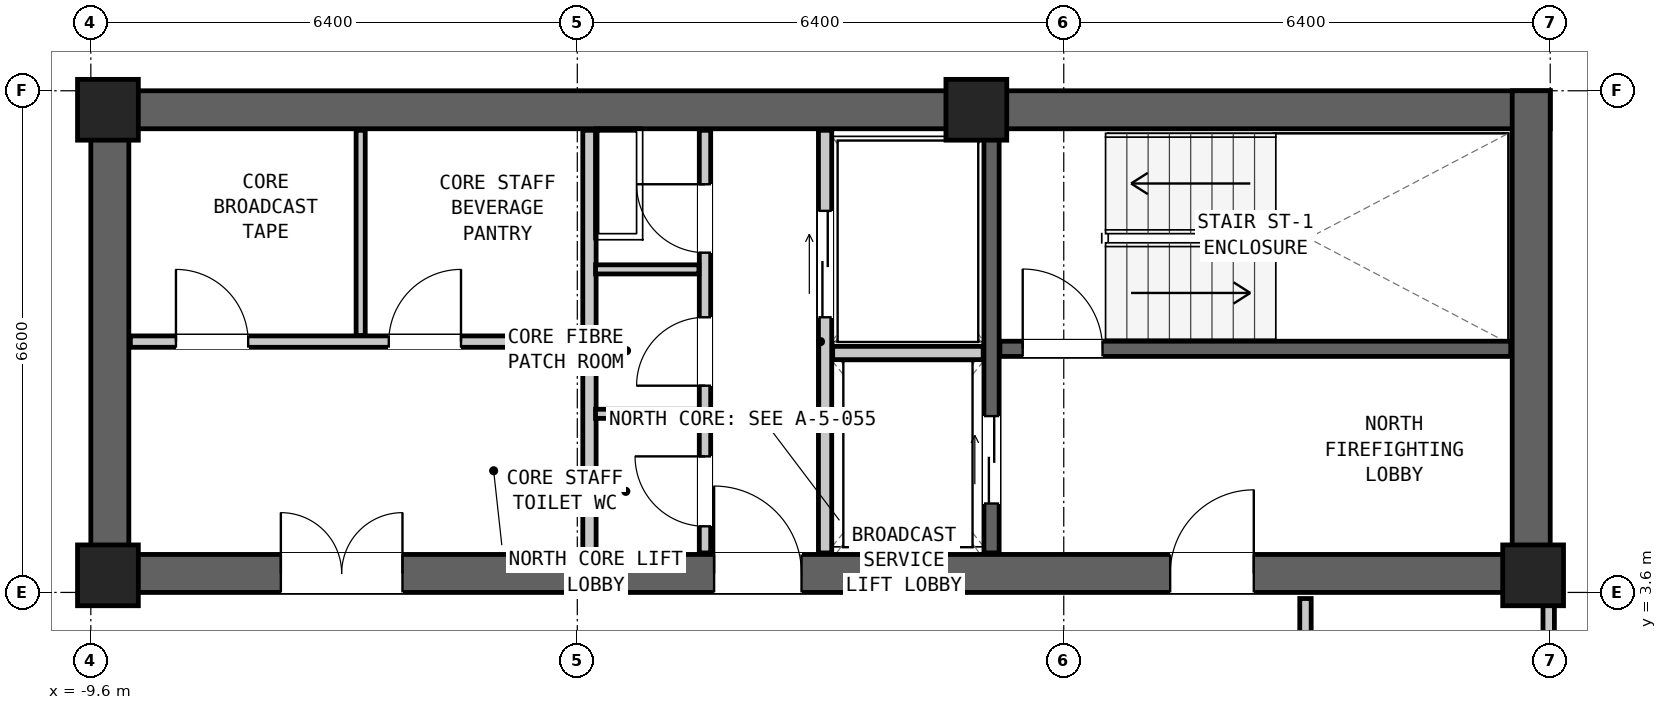
"""IFC4 building model, lengths in metres.
Left out: names, types, materials, properties, quantities, classifications, styles, units other than length and angle.
Written with IfcOpenShell. Run it as: python <this file> out.ifc"""

import sys

from ifc_helpers import new_model, si_unit, direction, frame, frame_2d, origin, origin_2d, place, context, subcontext, project, spatial, rectangle, extrude, element, fill, save


model = new_model("IFC4")
c1 = context("Model", 3, precision=1e-05, world=origin(), true_north=direction((0.0, 1.0)))
c2 = subcontext(c1, "Body", "Model", "MODEL_VIEW")
j1 = project(units=[si_unit("LENGTHUNIT", "METRE"), si_unit("PLANEANGLEUNIT", "RADIAN")], contexts=[c1])
p1 = place(None, origin())
s1 = spatial("IfcSite", under=j1, at=p1, CompositionType="ELEMENT")
p2 = place(p1, origin())
s2 = spatial("IfcBuilding", under=s1, at=p2, CompositionType="ELEMENT")
p3 = place(p2, frame((0.0, 0.0, 177.5)))
s3 = spatial("IfcBuildingStorey", under=s2, at=p3, CompositionType="ELEMENT", Elevation=177.5)
p4 = place(p3, frame((-9.6, 9.95, 0.0), z_axis=(0.0, 0.0, 1.0), x_axis=(1.0, 0.0, 0.0)))
e1 = element("IfcWall", 1, at=p4, inside=s3, PredefinedType="SHEAR", context=c2, shape_type="SweptSolid", body=[
    extrude(rectangle(XDim=19.2, YDim=0.5, at=frame_2d((9.6, 0.0))), origin(), (0.0, 0.0, 1.0), 3.05),
])
p5 = place(p3, frame((-9.6, 3.85, 0.0), z_axis=(0.0, 0.0, 1.0), x_axis=(1.0, 0.0, 0.0)))
e2 = element("IfcWall", 2, at=p5, inside=s3, PredefinedType="SHEAR", context=c2, shape_type="SweptSolid", body=[
    extrude(rectangle(XDim=19.2, YDim=0.5, at=frame_2d((9.6, 0.0))), origin(), (0.0, 0.0, 1.0), 3.05),
])
p6 = place(p5, frame((14.2, 0.0, 0.0)))
e3 = element("IfcOpeningElement", 3, at=p6, cuts=e2, PredefinedType="OPENING", context=c2, shape_type="SweptSolid", body=[
    extrude(rectangle(XDim=1.1, YDim=2.08, at=frame_2d((0.55, 1.04))), frame((0.0, 0.262, 0.0), z_axis=(0.0, -1.0, 0.0), x_axis=(1.0, 0.0, 0.0)), (0.0, 0.0, 1.0), 0.524),
])
p7 = place(p5, frame((8.2, 0.0, 0.0)))
e4 = element("IfcOpeningElement", 4, at=p7, cuts=e2, PredefinedType="OPENING", context=c2, shape_type="SweptSolid", body=[
    extrude(rectangle(XDim=1.15, YDim=2.1, at=frame_2d((0.575, 1.05))), frame((0.0, 0.262, 0.0), z_axis=(0.0, -1.0, 0.0), x_axis=(1.0, 0.0, 0.0)), (0.0, 0.0, 1.0), 0.524),
])
p8 = place(p5, frame((2.5, 0.0, 0.0)))
e5 = element("IfcOpeningElement", 5, at=p8, cuts=e2, PredefinedType="OPENING", context=c2, shape_type="SweptSolid", body=[
    extrude(rectangle(XDim=1.6, YDim=2.12, at=frame_2d((0.8, 1.06))), frame((0.0, 0.262, 0.0), z_axis=(0.0, -1.0, 0.0), x_axis=(1.0, 0.0, 0.0)), (0.0, 0.0, 1.0), 0.524),
])
for number, where, z_axis, x_axis in (
    (6, (-9.35, 3.6, 0.0), (0.0, 0.0, 1.0), (0.0, 1.0, 0.0)),
    (7, (9.35, 3.6, 0.0), (0.0, 0.0, 1.0), (0.0, 1.0, 0.0)),
):
    element("IfcWall", number, at=place(p3, frame(where, z_axis=z_axis, x_axis=x_axis)), inside=s3, PredefinedType="SHEAR", context=c2, shape_type="SweptSolid", body=[
        extrude(rectangle(XDim=6.6, YDim=0.5, at=frame_2d((3.3, 0.0))), origin(), (0.0, 0.0, 1.0), 3.05),
    ])
for number, where, z_axis, x_axis in (
    (8, (-9.375, 9.95, 0.0), (0.0, 0.0, 1.0), (1.0, 0.0, 0.0)),
    (9, (2.05, 9.95, 0.0), (0.0, 0.0, 1.0), (1.0, 0.0, 0.0)),
    (10, (-9.375, 3.825, 0.0), (0.0, 0.0, 1.0), (1.0, 0.0, 0.0)),
    (11, (9.375, 3.825, 0.0), (0.0, 0.0, 1.0), (1.0, 0.0, 0.0)),
):
    element("IfcColumn", number, at=place(p3, frame(where, z_axis=z_axis, x_axis=x_axis)), inside=s3, PredefinedType="COLUMN", context=c2, shape_type="SweptSolid", body=[
        extrude(rectangle(XDim=0.8, YDim=0.8, at=origin_2d()), origin(), (0.0, 0.0, 1.0), 3.05),
    ])
p9 = place(p3, frame((2.36, 6.805, 0.0), z_axis=(0.0, 0.0, 1.0), x_axis=(1.0, 0.0, 0.0)))
e12 = element("IfcWall", 12, at=p9, inside=s3, PredefinedType="SHEAR", context=c2, shape_type="SweptSolid", body=[
    extrude(rectangle(XDim=6.72, YDim=0.2, at=frame_2d((3.36, 0.0))), origin(), (0.0, 0.0, 1.0), 2.83),
])
p10 = place(p9, frame((0.3, 0.0, 0.0)))
e13 = element("IfcOpeningElement", 13, at=p10, cuts=e12, PredefinedType="OPENING", context=c2, shape_type="SweptSolid", body=[
    extrude(rectangle(XDim=1.05, YDim=2.08, at=frame_2d((0.525, 1.04))), frame((0.0, 0.112, 0.0), z_axis=(0.0, -1.0, 0.0), x_axis=(1.0, 0.0, 0.0)), (0.0, 0.0, 1.0), 0.224),
])
p11 = place(p3, frame((2.25, 4.12, 0.0), z_axis=(0.0, 0.0, 1.0), x_axis=(0.0, 1.0, 0.0)))
e14 = element("IfcWall", 14, at=p11, inside=s3, PredefinedType="SHEAR", context=c2, shape_type="SweptSolid", body=[
    extrude(rectangle(XDim=5.56, YDim=0.2, at=frame_2d((2.78, 0.0))), origin(), (0.0, 0.0, 1.0), 2.83),
])
p12 = place(p11, frame((0.65, 0.0, 0.0)))
e15 = element("IfcOpeningElement", 15, at=p12, cuts=e14, PredefinedType="OPENING", context=c2, shape_type="SweptSolid", body=[
    extrude(rectangle(XDim=1.15, YDim=2.08, at=frame_2d((0.575, 1.04))), frame((0.0, 0.112, 0.0), z_axis=(0.0, -1.0, 0.0), x_axis=(1.0, 0.0, 0.0)), (0.0, 0.0, 1.0), 0.224),
])
p13 = place(p3, frame((0.06, 4.12, 0.0), z_axis=(0.0, 0.0, 1.0), x_axis=(0.0, 1.0, 0.0)))
e16 = element("IfcWall", 16, at=p13, inside=s3, PredefinedType="PARTITIONING", context=c2, shape_type="SweptSolid", body=[
    extrude(rectangle(XDim=5.56, YDim=0.175, at=frame_2d((2.78, 0.0))), origin(), (0.0, 0.0, 1.0), 2.83),
])
p14 = place(p13, frame((3.1, 0.0, 0.0)))
e17 = element("IfcOpeningElement", 17, at=p14, cuts=e16, PredefinedType="OPENING", context=c2, shape_type="SweptSolid", body=[
    extrude(rectangle(XDim=1.4, YDim=2.12, at=frame_2d((0.7, 1.06))), frame((0.0, 0.1, 0.0), z_axis=(0.0, -1.0, 0.0), x_axis=(1.0, 0.0, 0.0)), (0.0, 0.0, 1.0), 0.199),
])
p15 = place(p3, frame((0.16, 6.75, 0.0), z_axis=(0.0, 0.0, 1.0), x_axis=(1.0, 0.0, 0.0)))
e18 = element("IfcWall", 18, at=p15, inside=s3, PredefinedType="PARTITIONING", context=c2, shape_type="SweptSolid", body=[
    extrude(rectangle(XDim=1.98, YDim=0.175, at=frame_2d((0.99, 0.0))), origin(), (0.0, 0.0, 1.0), 2.83),
])
p16 = place(p3, frame((-3.04, 4.12, 0.0), z_axis=(0.0, 0.0, 1.0), x_axis=(0.0, 1.0, 0.0)))
e19 = element("IfcWall", 19, at=p16, inside=s3, PredefinedType="PARTITIONING", context=c2, shape_type="SweptSolid", body=[
    extrude(rectangle(XDim=5.56, YDim=0.175, at=frame_2d((2.78, 0.0))), origin(), (0.0, 0.0, 1.0), 2.83),
])
p17 = place(p3, frame((-1.52, 4.12, 0.0), z_axis=(0.0, 0.0, 1.0), x_axis=(0.0, 1.0, 0.0)))
e20 = element("IfcWall", 20, at=p17, inside=s3, PredefinedType="PARTITIONING", context=c2, shape_type="SweptSolid", body=[
    extrude(rectangle(XDim=5.56, YDim=0.15, at=frame_2d((2.78, 0.0))), origin(), (0.0, 0.0, 1.0), 2.83),
])
p18 = place(p17, frame((3.95, 0.0, 0.0)))
e21 = element("IfcOpeningElement", 21, at=p18, cuts=e20, PredefinedType="OPENING", context=c2, shape_type="SweptSolid", body=[
    extrude(rectangle(XDim=0.9, YDim=2.05, at=frame_2d((0.45, 1.025))), frame((0.0, 0.087, 0.0), z_axis=(0.0, -1.0, 0.0), x_axis=(1.0, 0.0, 0.0)), (0.0, 0.0, 1.0), 0.174),
])
p19 = place(p17, frame((2.2, 0.0, 0.0)))
e22 = element("IfcOpeningElement", 22, at=p19, cuts=e20, PredefinedType="OPENING", context=c2, shape_type="SweptSolid", body=[
    extrude(rectangle(XDim=0.9, YDim=2.05, at=frame_2d((0.45, 1.025))), frame((0.0, 0.087, 0.0), z_axis=(0.0, -1.0, 0.0), x_axis=(1.0, 0.0, 0.0)), (0.0, 0.0, 1.0), 0.174),
])
p20 = place(p17, frame((0.35, 0.0, 0.0)))
e23 = element("IfcOpeningElement", 23, at=p20, cuts=e20, PredefinedType="OPENING", context=c2, shape_type="SweptSolid", body=[
    extrude(rectangle(XDim=0.92, YDim=2.1, at=frame_2d((0.46, 1.05))), frame((0.0, 0.087, 0.0), z_axis=(0.0, -1.0, 0.0), x_axis=(1.0, 0.0, 0.0)), (0.0, 0.0, 1.0), 0.174),
])
for number, where, z_axis, x_axis in (
    (24, (-2.96, 5.95, 0.0), (0.0, 0.0, 1.0), (1.0, 0.0, 0.0)),
    (25, (-2.96, 7.85, 0.0), (0.0, 0.0, 1.0), (1.0, 0.0, 0.0)),
):
    element("IfcWall", number, at=place(p3, frame(where, z_axis=z_axis, x_axis=x_axis)), inside=s3, PredefinedType="PARTITIONING", context=c2, shape_type="SweptSolid", body=[
        extrude(rectangle(XDim=1.36, YDim=0.12, at=frame_2d((0.68, 0.0))), origin(), (0.0, 0.0, 1.0), 2.83),
    ])
p21 = place(p3, frame((-9.08, 6.9, 0.0), z_axis=(0.0, 0.0, 1.0), x_axis=(1.0, 0.0, 0.0)))
e26 = element("IfcWall", 26, at=p21, inside=s3, PredefinedType="PARTITIONING", context=c2, shape_type="SweptSolid", body=[
    extrude(rectangle(XDim=5.96, YDim=0.15, at=frame_2d((2.98, 0.0))), origin(), (0.0, 0.0, 1.0), 2.83),
])
p22 = place(p21, frame((0.6, 0.0, 0.0)))
e27 = element("IfcOpeningElement", 27, at=p22, cuts=e26, PredefinedType="OPENING", context=c2, shape_type="SweptSolid", body=[
    extrude(rectangle(XDim=0.95, YDim=2.1, at=frame_2d((0.475, 1.05))), frame((0.0, 0.087, 0.0), z_axis=(0.0, -1.0, 0.0), x_axis=(1.0, 0.0, 0.0)), (0.0, 0.0, 1.0), 0.174),
])
p23 = place(p21, frame((3.4, 0.0, 0.0)))
e28 = element("IfcOpeningElement", 28, at=p23, cuts=e26, PredefinedType="OPENING", context=c2, shape_type="SweptSolid", body=[
    extrude(rectangle(XDim=0.95, YDim=2.1, at=frame_2d((0.475, 1.05))), frame((0.0, 0.087, 0.0), z_axis=(0.0, -1.0, 0.0), x_axis=(1.0, 0.0, 0.0)), (0.0, 0.0, 1.0), 0.174),
])
p24 = place(p3, frame((-6.05, 6.98, 0.0), z_axis=(0.0, 0.0, 1.0), x_axis=(0.0, 1.0, 0.0)))
e29 = element("IfcWall", 29, at=p24, inside=s3, PredefinedType="PARTITIONING", context=c2, shape_type="SweptSolid", body=[
    extrude(rectangle(XDim=2.7, YDim=0.12, at=frame_2d((1.35, 0.0))), origin(), (0.0, 0.0, 1.0), 2.83),
])
p25 = place(p3, frame((6.38, -2.32, 0.0), z_axis=(0.0, 0.0, 1.0), x_axis=(0.0, 1.0, 0.0)))
e30 = element("IfcWall", 30, at=p25, inside=s3, PredefinedType="PARTITIONING", context=c2, shape_type="SweptSolid", body=[
    extrude(rectangle(XDim=5.84, YDim=0.15, at=frame_2d((2.92, 0.0))), origin(), (0.0, 0.0, 1.0), 2.198),
])
p26 = place(p3, frame((9.58, -2.32, 0.0), z_axis=(0.0, 0.0, 1.0), x_axis=(0.0, 1.0, 0.0)))
e31 = element("IfcWall", 31, at=p26, inside=s3, PredefinedType="PARTITIONING", context=c2, shape_type="SweptSolid", body=[
    extrude(rectangle(XDim=5.84, YDim=0.15, at=frame_2d((2.92, 0.0))), origin(), (0.0, 0.0, 1.0), 2.198),
])
p27 = place(p26, frame((2.445, 0.0, 0.0)))
e32 = element("IfcOpeningElement", 32, at=p27, cuts=e31, PredefinedType="OPENING", context=c2, shape_type="SweptSolid", body=[
    extrude(rectangle(XDim=0.95, YDim=2.1, at=frame_2d((0.475, 1.05))), frame((0.0, 0.087, 0.0), z_axis=(0.0, -1.0, 0.0), x_axis=(1.0, 0.0, 0.0)), (0.0, 0.0, 1.0), 0.174),
])
p28 = place(p10, origin())
e33 = element("IfcDoor", 33, at=p28, inside=s3, OperationType="SINGLE_SWING_LEFT", PredefinedType="DOOR", context=c2, shape_type="SweptSolid", body=[
    extrude(rectangle(XDim=1.05, YDim=2.08, at=frame_2d((0.525, 1.04))), frame((0.0, 0.025, 0.0), z_axis=(0.0, -1.0, 0.0), x_axis=(1.0, 0.0, 0.0)), (0.0, 0.0, 1.0), 0.05),
])
fill(e13, e33)
p29 = place(p6, origin())
e34 = element("IfcDoor", 34, at=p29, inside=s3, OperationType="SINGLE_SWING_RIGHT", PredefinedType="DOOR", context=c2, shape_type="SweptSolid", body=[
    extrude(rectangle(XDim=1.1, YDim=2.08, at=frame_2d((0.55, 1.04))), frame((0.0, 0.025, 0.0), z_axis=(0.0, -1.0, 0.0), x_axis=(1.0, 0.0, 0.0)), (0.0, 0.0, 1.0), 0.05),
])
fill(e3, e34)
p30 = place(p12, origin())
e35 = element("IfcDoor", 35, at=p30, inside=s3, OperationType="DOUBLE_DOOR_SLIDING", PredefinedType="DOOR", context=c2, shape_type="SweptSolid", body=[
    extrude(rectangle(XDim=1.15, YDim=2.08, at=frame_2d((0.575, 1.04))), frame((0.0, 0.025, 0.0), z_axis=(0.0, -1.0, 0.0), x_axis=(1.0, 0.0, 0.0)), (0.0, 0.0, 1.0), 0.05),
])
fill(e15, e35)
p31 = place(p14, origin())
e36 = element("IfcDoor", 36, at=p31, inside=s3, OperationType="DOUBLE_DOOR_SLIDING", PredefinedType="DOOR", context=c2, shape_type="SweptSolid", body=[
    extrude(rectangle(XDim=1.4, YDim=2.12, at=frame_2d((0.7, 1.06))), frame((0.0, 0.025, 0.0), z_axis=(0.0, -1.0, 0.0), x_axis=(1.0, 0.0, 0.0)), (0.0, 0.0, 1.0), 0.05),
])
fill(e17, e36)
p32 = place(p7, origin())
e37 = element("IfcDoor", 37, at=p32, inside=s3, OperationType="SINGLE_SWING_LEFT", PredefinedType="DOOR", context=c2, shape_type="SweptSolid", body=[
    extrude(rectangle(XDim=1.15, YDim=2.1, at=frame_2d((0.575, 1.05))), frame((0.0, 0.025, 0.0), z_axis=(0.0, -1.0, 0.0), x_axis=(1.0, 0.0, 0.0)), (0.0, 0.0, 1.0), 0.05),
])
fill(e4, e37)
p33 = place(p18, origin())
e38 = element("IfcDoor", 38, at=p33, inside=s3, OperationType="SINGLE_SWING_RIGHT", PredefinedType="DOOR", context=c2, shape_type="SweptSolid", body=[
    extrude(rectangle(XDim=0.9, YDim=2.05, at=frame_2d((0.45, 1.025))), frame((0.0, 0.025, 0.0), z_axis=(0.0, -1.0, 0.0), x_axis=(1.0, 0.0, 0.0)), (0.0, 0.0, 1.0), 0.05),
])
fill(e21, e38)
p34 = place(p19, origin())
e39 = element("IfcDoor", 39, at=p34, inside=s3, OperationType="SINGLE_SWING_LEFT", PredefinedType="DOOR", context=c2, shape_type="SweptSolid", body=[
    extrude(rectangle(XDim=0.9, YDim=2.05, at=frame_2d((0.45, 1.025))), frame((0.0, 0.025, 0.0), z_axis=(0.0, -1.0, 0.0), x_axis=(1.0, 0.0, 0.0)), (0.0, 0.0, 1.0), 0.05),
])
fill(e22, e39)
p35 = place(p20, origin())
e40 = element("IfcDoor", 40, at=p35, inside=s3, OperationType="SINGLE_SWING_RIGHT", PredefinedType="DOOR", context=c2, shape_type="SweptSolid", body=[
    extrude(rectangle(XDim=0.92, YDim=2.1, at=frame_2d((0.46, 1.05))), frame((0.0, 0.025, 0.0), z_axis=(0.0, -1.0, 0.0), x_axis=(1.0, 0.0, 0.0)), (0.0, 0.0, 1.0), 0.05),
])
fill(e23, e40)
p36 = place(p8, origin())
e41 = element("IfcDoor", 41, at=p36, inside=s3, OperationType="DOUBLE_DOOR_SINGLE_SWING", PredefinedType="DOOR", context=c2, shape_type="SweptSolid", body=[
    extrude(rectangle(XDim=1.6, YDim=2.12, at=frame_2d((0.8, 1.06))), frame((0.0, 0.025, 0.0), z_axis=(0.0, -1.0, 0.0), x_axis=(1.0, 0.0, 0.0)), (0.0, 0.0, 1.0), 0.05),
])
fill(e5, e41)
p37 = place(p22, origin())
e42 = element("IfcDoor", 42, at=p37, inside=s3, OperationType="SINGLE_SWING_LEFT", PredefinedType="DOOR", context=c2, shape_type="SweptSolid", body=[
    extrude(rectangle(XDim=0.95, YDim=2.1, at=frame_2d((0.475, 1.05))), frame((0.0, 0.025, 0.0), z_axis=(0.0, -1.0, 0.0), x_axis=(1.0, 0.0, 0.0)), (0.0, 0.0, 1.0), 0.05),
])
fill(e27, e42)
p38 = place(p23, origin())
e43 = element("IfcDoor", 43, at=p38, inside=s3, OperationType="SINGLE_SWING_RIGHT", PredefinedType="DOOR", context=c2, shape_type="SweptSolid", body=[
    extrude(rectangle(XDim=0.95, YDim=2.1, at=frame_2d((0.475, 1.05))), frame((0.0, 0.025, 0.0), z_axis=(0.0, -1.0, 0.0), x_axis=(1.0, 0.0, 0.0)), (0.0, 0.0, 1.0), 0.05),
])
fill(e28, e43)
save(model, sys.argv[1])
